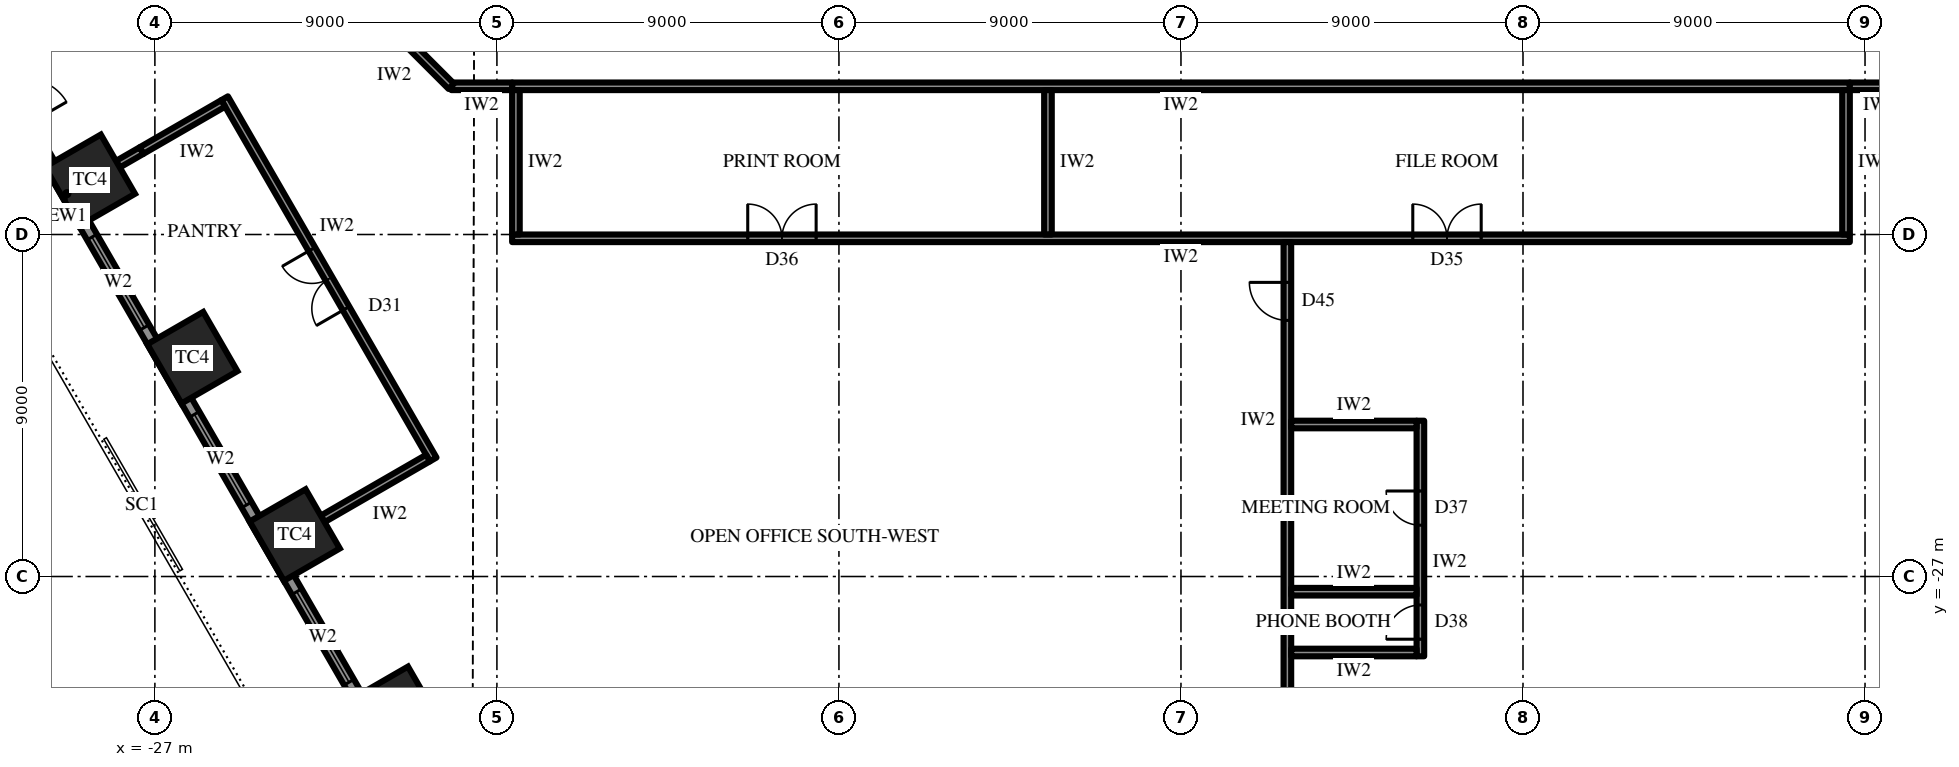
"""IFC4 building model, lengths in metres.
Left out: names, types, materials, properties, quantities, classifications, styles, units other than length and angle.
Written with IfcOpenShell. Run it as: python <this file> out.ifc"""

import sys

from ifc_helpers import new_model, si_unit, direction, frame, frame_2d, origin, origin_2d, place, context, subcontext, project, spatial, rectangle, extrude, element, fill, save


model = new_model("IFC4")
c1 = context("Model", 3, precision=1e-05, world=origin(), true_north=direction((0.0, 1.0)))
c2 = subcontext(c1, "Body", "Model", "MODEL_VIEW")
j1 = project(units=[si_unit("LENGTHUNIT", "METRE"), si_unit("PLANEANGLEUNIT", "RADIAN")], contexts=[c1])
p1 = place(None, origin())
s1 = spatial("IfcSite", under=j1, at=p1, CompositionType="ELEMENT")
p2 = place(p1, origin())
s2 = spatial("IfcBuilding", under=s1, at=p2, CompositionType="ELEMENT")
p3 = place(p2, frame((0.0, 0.0, 86.5)))
s3 = spatial("IfcBuildingStorey", under=s2, at=p3, CompositionType="ELEMENT", Elevation=86.5)
for number, where, z_axis, x_axis in (
    (1, (-28.709, -16.575, 0.0), (0.0, 0.0, 1.0), (0.5, -0.866, 0.0)),
    (2, (-26.014, -21.242, 0.0), (0.0, 0.0, 1.0), (0.5, -0.866, 0.0)),
    (3, (-23.32, -25.908, 0.0), (0.0, 0.0, 1.0), (0.5, -0.866, 0.0)),
    (4, (-20.626, -30.575, 0.0), (0.0, 0.0, 1.0), (0.5, -0.866, 0.0)),
):
    element("IfcColumn", number, at=place(p3, frame(where, z_axis=z_axis, x_axis=x_axis)), inside=s3, PredefinedType="COLUMN", context=c2, shape_type="SweptSolid", body=[
        extrude(rectangle(XDim=1.8, YDim=1.7, at=origin_2d()), origin(), (0.0, 0.0, 1.0), 4.2),
    ])
p4 = place(p3, frame((-37.398, -2.925, 0.0), z_axis=(0.0, 0.0, 1.0), x_axis=(0.499999163675, -0.866025886636, 0.0)))
e5 = element("IfcWall", 5, at=p4, inside=s3, PredefinedType="SOLIDWALL", context=c2, shape_type="SweptSolid", body=[
    extrude(rectangle(XDim=32.332, YDim=0.3, at=frame_2d((16.166, 0.0))), origin(), (0.0, 0.0, 1.0), 2.7),
])
p5 = place(p4, frame((1.319, 0.0, 0.6)))
e6 = element("IfcOpeningElement", 6, at=p5, cuts=e5, PredefinedType="OPENING", context=c2, shape_type="SweptSolid", body=[
    extrude(rectangle(XDim=2.75, YDim=1.85, at=frame_2d((1.375, 0.925))), frame((0.0, 0.16, 0.0), z_axis=(0.0, -1.0, 0.0), x_axis=(1.0, 0.0, 0.0)), (0.0, 0.0, 1.0), 0.32),
])
p6 = place(p4, frame((6.708, 0.0, 0.6)))
e7 = element("IfcOpeningElement", 7, at=p6, cuts=e5, PredefinedType="OPENING", context=c2, shape_type="SweptSolid", body=[
    extrude(rectangle(XDim=2.75, YDim=1.85, at=frame_2d((1.375, 0.925))), frame((0.0, 0.16, 0.0), z_axis=(0.0, -1.0, 0.0), x_axis=(1.0, 0.0, 0.0)), (0.0, 0.0, 1.0), 0.32),
])
p7 = place(p4, frame((12.872, 0.0, 0.0)))
e8 = element("IfcOpeningElement", 8, at=p7, cuts=e5, PredefinedType="OPENING", context=c2, shape_type="SweptSolid", body=[
    extrude(rectangle(XDim=1.2, YDim=2.4, at=frame_2d((0.6, 1.2))), frame((0.0, 0.16, 0.0), z_axis=(0.0, -1.0, 0.0), x_axis=(1.0, 0.0, 0.0)), (0.0, 0.0, 1.0), 0.32),
])
p8 = place(p4, frame((17.485, 0.0, 0.6)))
e9 = element("IfcOpeningElement", 9, at=p8, cuts=e5, PredefinedType="OPENING", context=c2, shape_type="SweptSolid", body=[
    extrude(rectangle(XDim=2.75, YDim=1.85, at=frame_2d((1.375, 0.925))), frame((0.0, 0.16, 0.0), z_axis=(0.0, -1.0, 0.0), x_axis=(1.0, 0.0, 0.0)), (0.0, 0.0, 1.0), 0.32),
])
p9 = place(p4, frame((22.874, 0.0, 0.6)))
e10 = element("IfcOpeningElement", 10, at=p9, cuts=e5, PredefinedType="OPENING", context=c2, shape_type="SweptSolid", body=[
    extrude(rectangle(XDim=2.75, YDim=1.85, at=frame_2d((1.375, 0.925))), frame((0.0, 0.16, 0.0), z_axis=(0.0, -1.0, 0.0), x_axis=(1.0, 0.0, 0.0)), (0.0, 0.0, 1.0), 0.32),
])
p10 = place(p4, frame((28.262, 0.0, 0.6)))
e11 = element("IfcOpeningElement", 11, at=p10, cuts=e5, PredefinedType="OPENING", context=c2, shape_type="SweptSolid", body=[
    extrude(rectangle(XDim=2.75, YDim=1.85, at=frame_2d((1.375, 0.925))), frame((0.0, 0.16, 0.0), z_axis=(0.0, -1.0, 0.0), x_axis=(1.0, 0.0, 0.0)), (0.0, 0.0, 1.0), 0.32),
])
p11 = place(p3, frame((17.6, -14.1, 0.0), z_axis=(0.0, 0.0, 1.0), x_axis=(-1.0, 0.0, 0.0)))
e12 = element("IfcWall", 12, at=p11, inside=s3, PredefinedType="PARTITIONING", context=c2, shape_type="SweptSolid", body=[
    extrude(rectangle(XDim=35.2, YDim=0.2, at=frame_2d((17.6, 0.0))), origin(), (0.0, 0.0, 1.0), 4.0),
])
p12 = place(p3, frame((17.6, -18.1, 0.0), z_axis=(0.0, 0.0, 1.0), x_axis=(-1.0, 0.0, 0.0)))
e13 = element("IfcWall", 13, at=p12, inside=s3, PredefinedType="PARTITIONING", context=c2, shape_type="SweptSolid", body=[
    extrude(rectangle(XDim=35.2, YDim=0.2, at=frame_2d((17.6, 0.0))), origin(), (0.0, 0.0, 1.0), 4.0),
])
p13 = place(p12, frame((9.7, 0.0, 0.0)))
e14 = element("IfcOpeningElement", 14, at=p13, cuts=e13, PredefinedType="OPENING", context=c2, shape_type="SweptSolid", body=[
    extrude(rectangle(XDim=1.8, YDim=2.4, at=frame_2d((0.9, 1.2))), frame((0.0, 0.11, 0.0), z_axis=(0.0, -1.0, 0.0), x_axis=(1.0, 0.0, 0.0)), (0.0, 0.0, 1.0), 0.22),
])
p14 = place(p12, frame((27.2, 0.0, 0.0)))
e15 = element("IfcOpeningElement", 15, at=p14, cuts=e13, PredefinedType="OPENING", context=c2, shape_type="SweptSolid", body=[
    extrude(rectangle(XDim=1.8, YDim=2.4, at=frame_2d((0.9, 1.2))), frame((0.0, 0.11, 0.0), z_axis=(0.0, -1.0, 0.0), x_axis=(1.0, 0.0, 0.0)), (0.0, 0.0, 1.0), 0.22),
])
for number, where, z_axis, x_axis in (
    (16, (17.5, -14.2, 0.0), (0.0, 0.0, 1.0), (0.0, -1.0, 0.0)),
    (17, (-3.5, -14.2, 0.0), (0.0, 0.0, 1.0), (0.0, -1.0, 0.0)),
    (18, (-17.5, -14.2, 0.0), (0.0, 0.0, 1.0), (0.0, -1.0, 0.0)),
):
    element("IfcWall", number, at=place(p3, frame(where, z_axis=z_axis, x_axis=x_axis)), inside=s3, PredefinedType="PARTITIONING", context=c2, shape_type="SweptSolid", body=[
        extrude(rectangle(XDim=3.8, YDim=0.2, at=frame_2d((1.9, 0.0))), origin(), (0.0, 0.0, 1.0), 4.0),
    ])
p15 = place(p3, frame((-25.165, -14.413, 0.0), z_axis=(0.0, 0.0, 1.0), x_axis=(0.500009305389, -0.866020031249, 0.0)))
e19 = element("IfcWall", 19, at=p15, inside=s3, PredefinedType="PARTITIONING", context=c2, shape_type="SweptSolid", body=[
    extrude(rectangle(XDim=10.977, YDim=0.2, at=frame_2d((5.489, 0.0))), origin(), (0.0, 0.0, 1.0), 4.0),
])
p16 = place(p15, frame((4.589, 0.0, 0.0)))
e20 = element("IfcOpeningElement", 20, at=p16, cuts=e19, PredefinedType="OPENING", context=c2, shape_type="SweptSolid", body=[
    extrude(rectangle(XDim=1.8, YDim=2.4, at=frame_2d((0.9, 1.2))), frame((0.0, 0.11, 0.0), z_axis=(0.0, -1.0, 0.0), x_axis=(1.0, 0.0, 0.0)), (0.0, 0.0, 1.0), 0.22),
])
p17 = place(p3, frame((-25.201, -14.55, 0.0), z_axis=(0.0, 0.0, 1.0), x_axis=(-0.866020232408, -0.500008956979, 0.0)))
e21 = element("IfcWall", 21, at=p17, inside=s3, PredefinedType="PARTITIONING", context=c2, shape_type="SweptSolid", body=[
    extrude(rectangle(XDim=2.483, YDim=0.2, at=frame_2d((1.242, 0.0))), origin(), (0.0, 0.0, 1.0), 4.0),
])
p18 = place(p3, frame((-27.352, -15.792, 0.0), z_axis=(0.0, 0.0, 1.0), x_axis=(-0.866117509073, -0.499840435016, 0.0)))
e22 = element("IfcWall", 22, at=p18, inside=s3, PredefinedType="PARTITIONING", context=c2, shape_type="SweptSolid", body=[
    extrude(rectangle(XDim=0.717, YDim=0.2, at=frame_2d((0.358, 0.0))), origin(), (0.0, 0.0, 1.0), 2.992),
])
p19 = place(p3, frame((-19.813, -23.883, 0.0), z_axis=(0.0, 0.0, 1.0), x_axis=(-0.866008981251, -0.500028443584, 0.0)))
e23 = element("IfcWall", 23, at=p19, inside=s3, PredefinedType="PARTITIONING", context=c2, shape_type="SweptSolid", body=[
    extrude(rectangle(XDim=3.2, YDim=0.2, at=frame_2d((1.6, 0.0))), origin(), (0.0, 0.0, 1.0), 2.992),
])
for number, where, z_axis, x_axis in (
    (24, (-17.6, -14.1, 0.0), (0.0, 0.0, 1.0), (-1.0, 0.0, 0.0)),
    (25, (19.2, -14.1, 0.0), (0.0, 0.0, 1.0), (-1.0, 0.0, 0.0)),
):
    element("IfcWall", number, at=place(p3, frame(where, z_axis=z_axis, x_axis=x_axis)), inside=s3, PredefinedType="PARTITIONING", context=c2, shape_type="SweptSolid", body=[
        extrude(rectangle(XDim=1.6, YDim=0.2, at=frame_2d((0.8, 0.0))), origin(), (0.0, 0.0, 1.0), 4.0),
    ])
p20 = place(p3, frame((-19.2, -14.1, 0.0), z_axis=(0.0, 0.0, 1.0), x_axis=(-0.707106781187, 0.707106781187, 0.0)))
e26 = element("IfcWall", 26, at=p20, inside=s3, PredefinedType="PARTITIONING", context=c2, shape_type="SweptSolid", body=[
    extrude(rectangle(XDim=2.546, YDim=0.2, at=frame_2d((1.273, 0.0))), origin(), (0.0, 0.0, 1.0), 4.0),
])
p21 = place(p3, frame((2.8, -18.2, 0.0), z_axis=(0.0, 0.0, 1.0), x_axis=(0.0, -1.0, 0.0)))
e27 = element("IfcWall", 27, at=p21, inside=s3, PredefinedType="PARTITIONING", context=c2, shape_type="SweptSolid", body=[
    extrude(rectangle(XDim=15.6, YDim=0.2, at=frame_2d((7.8, 0.0))), origin(), (0.0, 0.0, 1.0), 2.944),
])
p22 = place(p21, frame((1.06, 0.0, 0.0)))
e28 = element("IfcOpeningElement", 28, at=p22, cuts=e27, PredefinedType="OPENING", context=c2, shape_type="SweptSolid", body=[
    extrude(rectangle(XDim=1.0, YDim=2.2, at=frame_2d((0.5, 1.1))), frame((0.0, 0.11, 0.0), z_axis=(0.0, -1.0, 0.0), x_axis=(1.0, 0.0, 0.0)), (0.0, 0.0, 1.0), 0.22),
])
p23 = place(p3, frame((6.3, -22.9, 0.0), z_axis=(0.0, 0.0, 1.0), x_axis=(0.0, -1.0, 0.0)))
e29 = element("IfcWall", 29, at=p23, inside=s3, PredefinedType="PARTITIONING", context=c2, shape_type="SweptSolid", body=[
    extrude(rectangle(XDim=6.2, YDim=0.2, at=frame_2d((3.1, 0.0))), origin(), (0.0, 0.0, 1.0), 4.0),
])
p24 = place(p23, frame((1.85, 0.0, 0.0)))
e30 = element("IfcOpeningElement", 30, at=p24, cuts=e29, PredefinedType="OPENING", context=c2, shape_type="SweptSolid", body=[
    extrude(rectangle(XDim=0.9, YDim=2.2, at=frame_2d((0.45, 1.1))), frame((0.0, 0.11, 0.0), z_axis=(0.0, -1.0, 0.0), x_axis=(1.0, 0.0, 0.0)), (0.0, 0.0, 1.0), 0.22),
])
p25 = place(p23, frame((4.85, 0.0, 0.0)))
e31 = element("IfcOpeningElement", 31, at=p25, cuts=e29, PredefinedType="OPENING", context=c2, shape_type="SweptSolid", body=[
    extrude(rectangle(XDim=0.9, YDim=2.2, at=frame_2d((0.45, 1.1))), frame((0.0, 0.11, 0.0), z_axis=(0.0, -1.0, 0.0), x_axis=(1.0, 0.0, 0.0)), (0.0, 0.0, 1.0), 0.22),
])
for number, where, z_axis, x_axis in (
    (32, (2.9, -23.0, 0.0), (0.0, 0.0, 1.0), (1.0, 0.0, 0.0)),
    (33, (2.9, -27.4, 0.0), (0.0, 0.0, 1.0), (1.0, 0.0, 0.0)),
    (34, (2.9, -29.0, 0.0), (0.0, 0.0, 1.0), (1.0, 0.0, 0.0)),
):
    element("IfcWall", number, at=place(p3, frame(where, z_axis=z_axis, x_axis=x_axis)), inside=s3, PredefinedType="PARTITIONING", context=c2, shape_type="SweptSolid", body=[
        extrude(rectangle(XDim=3.3, YDim=0.2, at=frame_2d((1.65, 0.0))), origin(), (0.0, 0.0, 1.0), 4.0),
    ])
p26 = place(p8, origin())
e35 = element("IfcWindow", 35, at=p26, inside=s3, PartitioningType="SINGLE_PANEL", PredefinedType="WINDOW", context=c2, shape_type="SweptSolid", body=[
    extrude(rectangle(XDim=2.75, YDim=1.85, at=frame_2d((1.375, 0.925))), frame((0.0, 0.03, 0.0), z_axis=(0.0, -1.0, 0.0), x_axis=(1.0, 0.0, 0.0)), (0.0, 0.0, 1.0), 0.06),
])
fill(e9, e35)
p27 = place(p9, origin())
e36 = element("IfcWindow", 36, at=p27, inside=s3, PartitioningType="SINGLE_PANEL", PredefinedType="WINDOW", context=c2, shape_type="SweptSolid", body=[
    extrude(rectangle(XDim=2.75, YDim=1.85, at=frame_2d((1.375, 0.925))), frame((0.0, 0.03, 0.0), z_axis=(0.0, -1.0, 0.0), x_axis=(1.0, 0.0, 0.0)), (0.0, 0.0, 1.0), 0.06),
])
fill(e10, e36)
p28 = place(p10, origin())
e37 = element("IfcWindow", 37, at=p28, inside=s3, PartitioningType="SINGLE_PANEL", PredefinedType="WINDOW", context=c2, shape_type="SweptSolid", body=[
    extrude(rectangle(XDim=2.75, YDim=1.85, at=frame_2d((1.375, 0.925))), frame((0.0, 0.03, 0.0), z_axis=(0.0, -1.0, 0.0), x_axis=(1.0, 0.0, 0.0)), (0.0, 0.0, 1.0), 0.06),
])
fill(e11, e37)
p29 = place(p13, frame((1.8, 0.0, 0.0), z_axis=(0.0, 0.0, 1.0), x_axis=(-1.0, 0.0, 0.0)))
e38 = element("IfcDoor", 38, at=p29, inside=s3, OperationType="DOUBLE_DOOR_SINGLE_SWING", PredefinedType="DOOR", context=c2, shape_type="SweptSolid", body=[
    extrude(rectangle(XDim=1.8, YDim=2.4, at=frame_2d((0.9, 1.2))), frame((0.0, 0.025, 0.0), z_axis=(0.0, -1.0, 0.0), x_axis=(1.0, 0.0, 0.0)), (0.0, 0.0, 1.0), 0.05),
])
fill(e14, e38)
p30 = place(p14, frame((1.8, 0.0, 0.0), z_axis=(0.0, 0.0, 1.0), x_axis=(-1.0, 0.0, 0.0)))
e39 = element("IfcDoor", 39, at=p30, inside=s3, OperationType="DOUBLE_DOOR_SINGLE_SWING", PredefinedType="DOOR", context=c2, shape_type="SweptSolid", body=[
    extrude(rectangle(XDim=1.8, YDim=2.4, at=frame_2d((0.9, 1.2))), frame((0.0, 0.025, 0.0), z_axis=(0.0, -1.0, 0.0), x_axis=(1.0, 0.0, 0.0)), (0.0, 0.0, 1.0), 0.05),
])
fill(e15, e39)
p31 = place(p16, frame((1.8, 0.0, 0.0), z_axis=(0.0, 0.0, 1.0), x_axis=(-1.0, 0.0, 0.0)))
e40 = element("IfcDoor", 40, at=p31, inside=s3, OperationType="DOUBLE_DOOR_SINGLE_SWING", PredefinedType="DOOR", context=c2, shape_type="SweptSolid", body=[
    extrude(rectangle(XDim=1.8, YDim=2.4, at=frame_2d((0.9, 1.2))), frame((0.0, 0.025, 0.0), z_axis=(0.0, -1.0, 0.0), x_axis=(1.0, 0.0, 0.0)), (0.0, 0.0, 1.0), 0.05),
])
fill(e20, e40)
p32 = place(p22, frame((1.0, 0.0, 0.0), z_axis=(0.0, 0.0, 1.0), x_axis=(-1.0, 0.0, 0.0)))
e41 = element("IfcDoor", 41, at=p32, inside=s3, OperationType="SINGLE_SWING_LEFT", PredefinedType="DOOR", context=c2, shape_type="SweptSolid", body=[
    extrude(rectangle(XDim=1.0, YDim=2.2, at=frame_2d((0.5, 1.1))), frame((0.0, 0.025, 0.0), z_axis=(0.0, -1.0, 0.0), x_axis=(1.0, 0.0, 0.0)), (0.0, 0.0, 1.0), 0.05),
])
fill(e28, e41)
p33 = place(p24, frame((0.9, 0.0, 0.0), z_axis=(0.0, 0.0, 1.0), x_axis=(-1.0, 0.0, 0.0)))
e42 = element("IfcDoor", 42, at=p33, inside=s3, OperationType="SINGLE_SWING_LEFT", PredefinedType="DOOR", context=c2, shape_type="SweptSolid", body=[
    extrude(rectangle(XDim=0.9, YDim=2.2, at=frame_2d((0.45, 1.1))), frame((0.0, 0.025, 0.0), z_axis=(0.0, -1.0, 0.0), x_axis=(1.0, 0.0, 0.0)), (0.0, 0.0, 1.0), 0.05),
])
fill(e30, e42)
p34 = place(p25, frame((0.9, 0.0, 0.0), z_axis=(0.0, 0.0, 1.0), x_axis=(-1.0, 0.0, 0.0)))
e43 = element("IfcDoor", 43, at=p34, inside=s3, OperationType="SINGLE_SWING_RIGHT", PredefinedType="DOOR", context=c2, shape_type="SweptSolid", body=[
    extrude(rectangle(XDim=0.9, YDim=2.2, at=frame_2d((0.45, 1.1))), frame((0.0, 0.025, 0.0), z_axis=(0.0, -1.0, 0.0), x_axis=(1.0, 0.0, 0.0)), (0.0, 0.0, 1.0), 0.05),
])
fill(e31, e43)
save(model, sys.argv[1])
